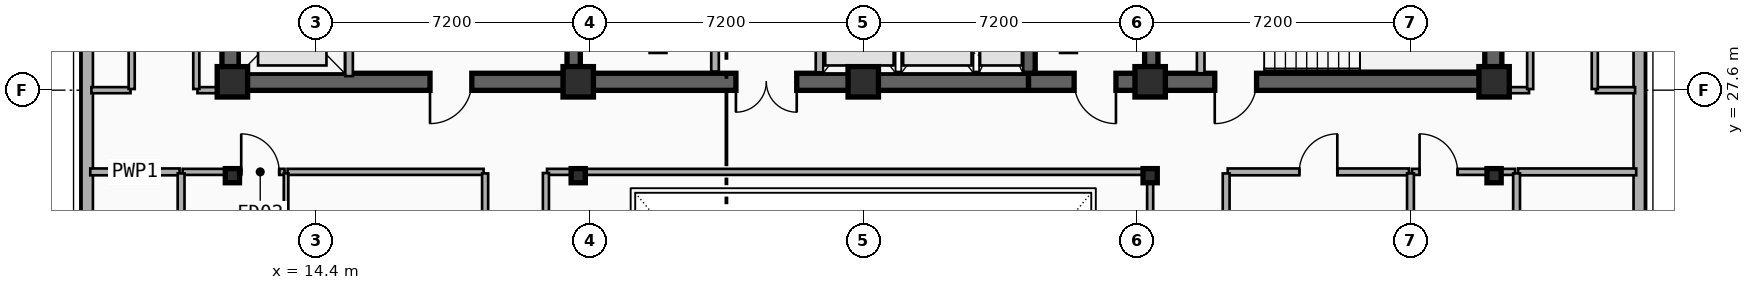
"""IFC4 building model, lengths in metres.
Left out: names, types, materials, properties, quantities, classifications, styles, units other than length and angle.
Written with IfcOpenShell. Run it as: python <this file> out.ifc"""

import sys

from ifc_helpers import new_model, si_unit, direction, frame, frame_2d, origin, origin_2d, place, context, subcontext, project, spatial, rectangle, i_section, extrude, element, fill, save


model = new_model("IFC4")
c1 = context("Model", 3, precision=1e-05, world=origin(), true_north=direction((0.0, 1.0)))
c2 = subcontext(c1, "Body", "Model", "MODEL_VIEW")
j1 = project(units=[si_unit("LENGTHUNIT", "METRE"), si_unit("PLANEANGLEUNIT", "RADIAN")], contexts=[c1])
p1 = place(None, origin())
s1 = spatial("IfcSite", under=j1, at=p1, CompositionType="ELEMENT")
p2 = place(p1, origin())
s2 = spatial("IfcBuilding", under=s1, at=p2, CompositionType="ELEMENT")
p3 = place(p2, frame((0.0, 0.0, 269.5)))
s3 = spatial("IfcBuildingStorey", under=s2, at=p3, CompositionType="ELEMENT", Elevation=269.5)
p4 = place(p3, frame((21.18, 27.82, 0.0), z_axis=(0.0, 0.0, 1.0), x_axis=(-1.0, 0.0, 0.0)))
e1 = element("IfcWall", 1, at=p4, inside=s3, PredefinedType="SHEAR", context=c2, shape_type="SweptSolid", body=[
    extrude(rectangle(XDim=9.03, YDim=0.45, at=frame_2d((4.515, 0.0))), origin(), (0.0, 0.0, 1.0), 3.7),
])
p5 = place(p4, frame((2.68, 0.0, 0.0)))
e2 = element("IfcOpeningElement", 2, at=p5, cuts=e1, PredefinedType="OPENING", context=c2, shape_type="SweptSolid", body=[
    extrude(rectangle(XDim=1.1, YDim=2.15, at=frame_2d((0.55, 1.075))), frame((0.0, 0.235, 0.0), z_axis=(0.0, -1.0, 0.0), x_axis=(1.0, 0.0, 0.0)), (0.0, 0.0, 1.0), 0.47),
])
p6 = place(p3, frame((33.15, 27.82, 0.0), z_axis=(0.0, 0.0, 1.0), x_axis=(-1.0, 0.0, 0.0)))
e3 = element("IfcWall", 3, at=p6, inside=s3, PredefinedType="SHEAR", context=c2, shape_type="SweptSolid", body=[
    extrude(rectangle(XDim=11.97, YDim=0.45, at=frame_2d((5.985, 0.0))), origin(), (0.0, 0.0, 1.0), 3.7),
])
p7 = place(p6, frame((6.1, 0.0, 0.0)))
e4 = element("IfcOpeningElement", 4, at=p7, cuts=e3, PredefinedType="OPENING", context=c2, shape_type="SweptSolid", body=[
    extrude(rectangle(XDim=1.6, YDim=2.2, at=frame_2d((0.8, 1.1))), frame((0.0, 0.235, 0.0), z_axis=(0.0, -1.0, 0.0), x_axis=(1.0, 0.0, 0.0)), (0.0, 0.0, 1.0), 0.47),
])
p8 = place(p3, frame((45.38, 27.82, 0.0), z_axis=(0.0, 0.0, 1.0), x_axis=(-1.0, 0.0, 0.0)))
e5 = element("IfcWall", 5, at=p8, inside=s3, PredefinedType="SHEAR", context=c2, shape_type="SweptSolid", body=[
    extrude(rectangle(XDim=12.23, YDim=0.45, at=frame_2d((6.115, 0.0))), origin(), (0.0, 0.0, 1.0), 3.7),
])
p9 = place(p8, frame((9.93, 0.0, 0.0)))
e6 = element("IfcOpeningElement", 6, at=p9, cuts=e5, PredefinedType="OPENING", context=c2, shape_type="SweptSolid", body=[
    extrude(rectangle(XDim=1.1, YDim=2.15, at=frame_2d((0.55, 1.075))), frame((0.0, 0.235, 0.0), z_axis=(0.0, -1.0, 0.0), x_axis=(1.0, 0.0, 0.0)), (0.0, 0.0, 1.0), 0.47),
])
p10 = place(p8, frame((6.23, 0.0, 0.0)))
e7 = element("IfcOpeningElement", 7, at=p10, cuts=e5, PredefinedType="OPENING", context=c2, shape_type="SweptSolid", body=[
    extrude(rectangle(XDim=1.1, YDim=2.15, at=frame_2d((0.55, 1.075))), frame((0.0, 0.235, 0.0), z_axis=(0.0, -1.0, 0.0), x_axis=(1.0, 0.0, 0.0)), (0.0, 0.0, 1.0), 0.47),
])
for number, where, z_axis, x_axis in (
    (8, (12.15, 28.045, 0.0), (0.0, 0.0, 1.0), (0.0, 1.0, 0.0)),
    (9, (45.38, 28.045, 0.0), (0.0, 0.0, 1.0), (0.0, 1.0, 0.0)),
):
    element("IfcWall", number, at=place(p3, frame(where, z_axis=z_axis, x_axis=x_axis)), inside=s3, PredefinedType="SHEAR", context=c2, shape_type="SweptSolid", body=[
        extrude(rectangle(XDim=8.78, YDim=0.45, at=frame_2d((4.39, 0.0))), origin(), (0.0, 0.0, 1.0), 3.7),
    ])
for number, where, z_axis, x_axis in (
    (10, (21.18, 28.045, 0.0), (0.0, 0.0, 1.0), (0.0, 1.0, 0.0)),
    (11, (33.15, 28.045, 0.0), (0.0, 0.0, 1.0), (0.0, 1.0, 0.0)),
):
    element("IfcWall", number, at=place(p3, frame(where, z_axis=z_axis, x_axis=x_axis)), inside=s3, PredefinedType="SHEAR", context=c2, shape_type="SweptSolid", body=[
        extrude(rectangle(XDim=8.78, YDim=0.35, at=frame_2d((4.39, 0.0))), origin(), (0.0, 0.0, 1.0), 3.7),
    ])
p11 = place(p3, frame((36.38, 28.045, 0.0), z_axis=(0.0, 0.0, 1.0), x_axis=(0.0, 1.0, 0.0)))
e12 = element("IfcWall", 12, at=p11, inside=s3, PredefinedType="SHEAR", context=c2, shape_type="SweptSolid", body=[
    extrude(rectangle(XDim=8.78, YDim=0.35, at=frame_2d((4.39, 0.0))), origin(), (0.0, 0.0, 1.0), 3.7),
])
p12 = place(p11, frame((3.735, 0.0, 0.0)))
e13 = element("IfcOpeningElement", 13, at=p12, cuts=e12, PredefinedType="OPENING", context=c2, shape_type="SweptSolid", body=[
    extrude(rectangle(XDim=1.1, YDim=2.15, at=frame_2d((0.55, 1.075))), frame((0.0, 0.185, 0.0), z_axis=(0.0, -1.0, 0.0), x_axis=(1.0, 0.0, 0.0)), (0.0, 0.0, 1.0), 0.37),
])
for number, where, z_axis, x_axis in (
    (14, (12.2, 27.82, 0.0), (0.0, 0.0, 1.0), (1.0, 0.0, 0.0)),
    (15, (21.3, 27.82, 0.0), (0.0, 0.0, 1.0), (1.0, 0.0, 0.0)),
    (16, (28.8, 27.82, 0.0), (0.0, 0.0, 1.0), (1.0, 0.0, 0.0)),
    (17, (36.35, 27.82, 0.0), (0.0, 0.0, 1.0), (1.0, 0.0, 0.0)),
    (18, (45.4, 27.82, 0.0), (0.0, 0.0, 1.0), (1.0, 0.0, 0.0)),
):
    element("IfcColumn", number, at=place(p3, frame(where, z_axis=z_axis, x_axis=x_axis)), inside=s3, PredefinedType="COLUMN", context=c2, shape_type="SweptSolid", body=[
        extrude(rectangle(XDim=0.8, YDim=0.8, at=origin_2d()), origin(), (0.0, 0.0, 1.0), 3.7),
    ])
for number, where, z_axis, x_axis in (
    (19, (12.2, 25.35, 0.0), (0.0, 0.0, 1.0), (1.0, 0.0, 0.0)),
    (20, (21.3, 25.35, 0.0), (0.0, 0.0, 1.0), (1.0, 0.0, 0.0)),
    (21, (36.35, 25.35, 0.0), (0.0, 0.0, 1.0), (1.0, 0.0, 0.0)),
    (22, (45.4, 25.35, 0.0), (0.0, 0.0, 1.0), (1.0, 0.0, 0.0)),
):
    element("IfcColumn", number, at=place(p3, frame(where, z_axis=z_axis, x_axis=x_axis)), inside=s3, PredefinedType="COLUMN", context=c2, shape_type="SweptSolid", body=[
        extrude(i_section(OverallWidth=0.374, OverallDepth=0.372, WebThickness=0.017, FlangeThickness=0.027, FilletRadius=0.015, at=origin_2d()), origin(), (0.0, 0.0, 1.0), 3.7),
    ])
p13 = place(p3, frame((49.22, 36.8, 0.0), z_axis=(0.0, 0.0, 1.0), x_axis=(0.0, -1.0, 0.0)))
e23 = element("IfcWall", 23, at=p13, inside=s3, PredefinedType="SOLIDWALL", context=c2, shape_type="SweptSolid", body=[
    extrude(rectangle(XDim=34.2, YDim=0.3, at=frame_2d((17.1, 0.0))), origin(), (0.0, 0.0, 1.0), 3.42),
])
p14 = place(p13, frame((25.775, 0.0, 0.75)))
e24 = element("IfcOpeningElement", 24, at=p14, cuts=e23, PredefinedType="OPENING", context=c2, shape_type="SweptSolid", body=[
    extrude(rectangle(XDim=2.1, YDim=2.1, at=frame_2d((1.05, 1.05))), frame((0.0, 0.16, 0.0), z_axis=(0.0, -1.0, 0.0), x_axis=(1.0, 0.0, 0.0)), (0.0, 0.0, 1.0), 0.32),
])
p15 = place(p13, frame((29.664, 0.0, 0.75)))
e25 = element("IfcOpeningElement", 25, at=p15, cuts=e23, PredefinedType="OPENING", context=c2, shape_type="SweptSolid", body=[
    extrude(rectangle(XDim=2.1, YDim=2.1, at=frame_2d((1.05, 1.05))), frame((0.0, 0.16, 0.0), z_axis=(0.0, -1.0, 0.0), x_axis=(1.0, 0.0, 0.0)), (0.0, 0.0, 1.0), 0.32),
])
p16 = place(p3, frame((8.38, 2.6, 0.0), z_axis=(0.0, 0.0, 1.0), x_axis=(0.0, 1.0, 0.0)))
e26 = element("IfcWall", 26, at=p16, inside=s3, PredefinedType="SOLIDWALL", context=c2, shape_type="SweptSolid", body=[
    extrude(rectangle(XDim=34.2, YDim=0.3, at=frame_2d((17.1, 0.0))), origin(), (0.0, 0.0, 1.0), 3.42),
])
p17 = place(p16, frame((1.584, 0.0, 0.75)))
e27 = element("IfcOpeningElement", 27, at=p17, cuts=e26, PredefinedType="OPENING", context=c2, shape_type="SweptSolid", body=[
    extrude(rectangle(XDim=2.1, YDim=2.1, at=frame_2d((1.05, 1.05))), frame((0.0, 0.16, 0.0), z_axis=(0.0, -1.0, 0.0), x_axis=(1.0, 0.0, 0.0)), (0.0, 0.0, 1.0), 0.32),
])
p18 = place(p16, frame((4.948, 0.0, 0.75)))
e28 = element("IfcOpeningElement", 28, at=p18, cuts=e26, PredefinedType="OPENING", context=c2, shape_type="SweptSolid", body=[
    extrude(rectangle(XDim=2.1, YDim=2.1, at=frame_2d((1.05, 1.05))), frame((0.0, 0.16, 0.0), z_axis=(0.0, -1.0, 0.0), x_axis=(1.0, 0.0, 0.0)), (0.0, 0.0, 1.0), 0.32),
])
p19 = place(p3, frame((15.27, 27.97, 0.0), z_axis=(0.0, 0.0, 1.0), x_axis=(0.0, 1.0, 0.0)))
e29 = element("IfcWall", 29, at=p19, inside=s3, PredefinedType="PARTITIONING", context=c2, shape_type="SweptSolid", body=[
    extrude(rectangle(XDim=2.96, YDim=0.2, at=frame_2d((1.48, 0.0))), origin(), (0.0, 0.0, 1.0), 2.49),
])
p20 = place(p19, frame((0.93, 0.0, 0.0)))
e30 = element("IfcOpeningElement", 30, at=p20, cuts=e29, PredefinedType="OPENING", context=c2, shape_type="SweptSolid", body=[
    extrude(rectangle(XDim=1.1, YDim=2.15, at=frame_2d((0.55, 1.075))), frame((0.0, 0.11, 0.0), z_axis=(0.0, -1.0, 0.0), x_axis=(1.0, 0.0, 0.0)), (0.0, 0.0, 1.0), 0.22),
])
p21 = place(p3, frame((27.65, 28.07, 0.0), z_axis=(0.0, 0.0, 1.0), x_axis=(0.0, 1.0, 0.0)))
e31 = element("IfcWall", 31, at=p21, inside=s3, PredefinedType="PARTITIONING", context=c2, shape_type="SweptSolid", body=[
    extrude(rectangle(XDim=2.58, YDim=0.2, at=frame_2d((1.29, 0.0))), origin(), (0.0, 0.0, 1.0), 2.49),
])
p22 = place(p3, frame((37.68, 28.045, 0.0), z_axis=(0.0, 0.0, 1.0), x_axis=(0.0, 1.0, 0.0)))
e32 = element("IfcWall", 32, at=p22, inside=s3, PredefinedType="PARTITIONING", context=c2, shape_type="SweptSolid", body=[
    extrude(rectangle(XDim=3.205, YDim=0.2, at=frame_2d((1.603, 0.0))), origin(), (0.0, 0.0, 1.0), 2.8),
])
p23 = place(p3, frame((24.9, 28.09, 0.0), z_axis=(0.0, 0.0, 1.0), x_axis=(0.0, 1.0, 0.0)))
e33 = element("IfcWall", 33, at=p23, inside=s3, PredefinedType="PARTITIONING", context=c2, shape_type="SweptSolid", body=[
    extrude(rectangle(XDim=2.62, YDim=0.2, at=frame_2d((1.31, 0.0))), origin(), (0.0, 0.0, 1.0), 2.8),
])
p24 = place(p23, frame((1.137, 0.0, 0.0)))
e34 = element("IfcOpeningElement", 34, at=p24, cuts=e33, PredefinedType="OPENING", context=c2, shape_type="SweptSolid", body=[
    extrude(rectangle(XDim=1.2, YDim=2.15, at=frame_2d((0.6, 1.075))), frame((0.0, 0.11, 0.0), z_axis=(0.0, -1.0, 0.0), x_axis=(1.0, 0.0, 0.0)), (0.0, 0.0, 1.0), 0.22),
])
p25 = place(p3, frame((10.89, 25.45, 0.0), z_axis=(0.0, 0.0, 1.0), x_axis=(1.0, 0.0, 0.0)))
e35 = element("IfcWall", 35, at=p25, inside=s3, PredefinedType="PARTITIONING", context=c2, shape_type="SweptSolid", body=[
    extrude(rectangle(XDim=2.682, YDim=0.16, at=frame_2d((1.341, 0.0))), origin(), (0.0, 0.0, 1.0), 2.7),
])
p26 = place(p25, frame((1.542, 0.0, 0.0)))
e36 = element("IfcOpeningElement", 36, at=p26, cuts=e35, PredefinedType="OPENING", context=c2, shape_type="SweptSolid", body=[
    extrude(rectangle(XDim=1.0, YDim=2.15, at=frame_2d((0.5, 1.075))), frame((0.0, 0.09, 0.0), z_axis=(0.0, -1.0, 0.0), x_axis=(1.0, 0.0, 0.0)), (0.0, 0.0, 1.0), 0.18),
])
p27 = place(p3, frame((8.46, 25.45, 0.0), z_axis=(0.0, 0.0, 1.0), x_axis=(1.0, 0.0, 0.0)))
e37 = element("IfcWall", 37, at=p27, inside=s3, PredefinedType="PLUMBINGWALL", context=c2, shape_type="SweptSolid", body=[
    extrude(rectangle(XDim=2.35, YDim=0.18, at=frame_2d((1.175, 0.0))), origin(), (0.0, 0.0, 1.0), 3.42),
])
p28 = place(p3, frame((13.652, 25.45, 0.0), z_axis=(0.0, 0.0, 1.0), x_axis=(1.0, 0.0, 0.0)))
e38 = element("IfcWall", 38, at=p28, inside=s3, PredefinedType="PARTITIONING", context=c2, shape_type="SweptSolid", body=[
    extrude(rectangle(XDim=5.158, YDim=0.16, at=frame_2d((2.579, 0.0))), origin(), (0.0, 0.0, 1.0), 3.42),
])
p29 = place(p3, frame((38.39, 25.45, 0.0), z_axis=(0.0, 0.0, 1.0), x_axis=(1.0, 0.0, 0.0)))
e39 = element("IfcWall", 39, at=p29, inside=s3, PredefinedType="PLUMBINGWALL", context=c2, shape_type="SweptSolid", body=[
    extrude(rectangle(XDim=4.77, YDim=0.18, at=frame_2d((2.385, 0.0))), origin(), (0.0, 0.0, 1.0), 3.42),
])
p30 = place(p29, frame((1.885, 0.0, 0.0)))
e40 = element("IfcOpeningElement", 40, at=p30, cuts=e39, PredefinedType="OPENING", context=c2, shape_type="SweptSolid", body=[
    extrude(rectangle(XDim=1.0, YDim=2.15, at=frame_2d((0.5, 1.075))), frame((0.0, 0.1, 0.0), z_axis=(0.0, -1.0, 0.0), x_axis=(1.0, 0.0, 0.0)), (0.0, 0.0, 1.0), 0.2),
])
p31 = place(p3, frame((43.24, 25.45, 0.0), z_axis=(0.0, 0.0, 1.0), x_axis=(1.0, 0.0, 0.0)))
e41 = element("IfcWall", 41, at=p31, inside=s3, PredefinedType="PARTITIONING", context=c2, shape_type="SweptSolid", body=[
    extrude(rectangle(XDim=2.712, YDim=0.16, at=frame_2d((1.356, 0.0))), origin(), (0.0, 0.0, 1.0), 2.7),
])
p32 = place(p31, frame((0.2, 0.0, 0.0)))
e42 = element("IfcOpeningElement", 42, at=p32, cuts=e41, PredefinedType="OPENING", context=c2, shape_type="SweptSolid", body=[
    extrude(rectangle(XDim=1.0, YDim=2.15, at=frame_2d((0.5, 1.075))), frame((0.0, 0.09, 0.0), z_axis=(0.0, -1.0, 0.0), x_axis=(1.0, 0.0, 0.0)), (0.0, 0.0, 1.0), 0.18),
])
p33 = place(p3, frame((46.032, 25.45, 0.0), z_axis=(0.0, 0.0, 1.0), x_axis=(1.0, 0.0, 0.0)))
e43 = element("IfcWall", 43, at=p33, inside=s3, PredefinedType="PLUMBINGWALL", context=c2, shape_type="SweptSolid", body=[
    extrude(rectangle(XDim=3.108, YDim=0.18, at=frame_2d((1.554, 0.0))), origin(), (0.0, 0.0, 1.0), 3.42),
])
p34 = place(p3, frame((18.85, 20.608, 0.0), z_axis=(0.0, 0.0, 1.0), x_axis=(0.0, 1.0, 0.0)))
e44 = element("IfcWall", 44, at=p34, inside=s3, PredefinedType="PARTITIONING", context=c2, shape_type="SweptSolid", body=[
    extrude(rectangle(XDim=4.802, YDim=0.16, at=frame_2d((2.401, 0.0))), origin(), (0.0, 0.0, 1.0), 2.96),
])
p35 = place(p3, frame((38.35, 19.04, 0.0), z_axis=(0.0, 0.0, 1.0), x_axis=(0.0, 1.0, 0.0)))
e45 = element("IfcWall", 45, at=p35, inside=s3, PredefinedType="PLUMBINGWALL", context=c2, shape_type="SweptSolid", body=[
    extrude(rectangle(XDim=6.37, YDim=0.18, at=frame_2d((3.185, 0.0))), origin(), (0.0, 0.0, 1.0), 2.96),
])
p36 = place(p35, frame((2.685, 0.0, 0.0)))
e46 = element("IfcOpeningElement", 46, at=p36, cuts=e45, PredefinedType="OPENING", context=c2, shape_type="SweptSolid", body=[
    extrude(rectangle(XDim=1.0, YDim=2.15, at=frame_2d((0.5, 1.075))), frame((0.0, 0.1, 0.0), z_axis=(0.0, -1.0, 0.0), x_axis=(1.0, 0.0, 0.0)), (0.0, 0.0, 1.0), 0.2),
])
p37 = place(p3, frame((10.85, 18.586, 0.0), z_axis=(0.0, 0.0, 1.0), x_axis=(0.0, 1.0, 0.0)))
e47 = element("IfcWall", 47, at=p37, inside=s3, PredefinedType="PLUMBINGWALL", context=c2, shape_type="SweptSolid", body=[
    extrude(rectangle(XDim=6.824, YDim=0.18, at=frame_2d((3.412, 0.0))), origin(), (0.0, 0.0, 1.0), 2.9),
])
p38 = place(p37, frame((2.987, 0.0, 0.0)))
e48 = element("IfcOpeningElement", 48, at=p38, cuts=e47, PredefinedType="OPENING", context=c2, shape_type="SweptSolid", body=[
    extrude(rectangle(XDim=0.85, YDim=2.1, at=frame_2d((0.425, 1.05))), frame((0.0, 0.1, 0.0), z_axis=(0.0, -1.0, 0.0), x_axis=(1.0, 0.0, 0.0)), (0.0, 0.0, 1.0), 0.2),
])
p39 = place(p3, frame((13.612, 20.608, 0.0), z_axis=(0.0, 0.0, 1.0), x_axis=(0.0, 1.0, 0.0)))
e49 = element("IfcWall", 49, at=p39, inside=s3, PredefinedType="PARTITIONING", context=c2, shape_type="SweptSolid", body=[
    extrude(rectangle(XDim=4.802, YDim=0.12, at=frame_2d((2.401, 0.0))), origin(), (0.0, 0.0, 1.0), 2.96),
])
p40 = place(p39, frame((1.951, 0.0, 0.0)))
e50 = element("IfcOpeningElement", 50, at=p40, cuts=e49, PredefinedType="OPENING", context=c2, shape_type="SweptSolid", body=[
    extrude(rectangle(XDim=0.9, YDim=2.1, at=frame_2d((0.45, 1.05))), frame((0.0, 0.07, 0.0), z_axis=(0.0, -1.0, 0.0), x_axis=(1.0, 0.0, 0.0)), (0.0, 0.0, 1.0), 0.14),
])
p41 = place(p3, frame((43.2, 19.04, 0.0), z_axis=(0.0, 0.0, 1.0), x_axis=(0.0, 1.0, 0.0)))
e51 = element("IfcWall", 51, at=p41, inside=s3, PredefinedType="PLUMBINGWALL", context=c2, shape_type="SweptSolid", body=[
    extrude(rectangle(XDim=6.37, YDim=0.18, at=frame_2d((3.185, 0.0))), origin(), (0.0, 0.0, 1.0), 2.96),
])
p42 = place(p3, frame((45.992, 19.772, 0.0), z_axis=(0.0, 0.0, 1.0), x_axis=(0.0, 1.0, 0.0)))
e52 = element("IfcWall", 52, at=p42, inside=s3, PredefinedType="PLUMBINGWALL", context=c2, shape_type="SweptSolid", body=[
    extrude(rectangle(XDim=5.638, YDim=0.18, at=frame_2d((2.819, 0.0))), origin(), (0.0, 0.0, 1.0), 2.7),
])
p43 = place(p42, frame((2.394, 0.0, 0.0)))
e53 = element("IfcOpeningElement", 53, at=p43, cuts=e52, PredefinedType="OPENING", context=c2, shape_type="SweptSolid", body=[
    extrude(rectangle(XDim=0.85, YDim=2.1, at=frame_2d((0.425, 1.05))), frame((0.0, 0.1, 0.0), z_axis=(0.0, -1.0, 0.0), x_axis=(1.0, 0.0, 0.0)), (0.0, 0.0, 1.0), 0.2),
])
p44 = place(p3, frame((20.48, 25.45, 0.0), z_axis=(0.0, 0.0, 1.0), x_axis=(1.0, 0.0, 0.0)))
e54 = element("IfcWall", 54, at=p44, inside=s3, PredefinedType="PARTITIONING", context=c2, shape_type="SweptSolid", body=[
    extrude(rectangle(XDim=15.84, YDim=0.16, at=frame_2d((7.92, 0.0))), origin(), (0.0, 0.0, 1.0), 2.7),
])
p45 = place(p3, frame((8.49, 27.6, 0.0), z_axis=(0.0, 0.0, 1.0), x_axis=(1.0, 0.0, 0.0)))
e55 = element("IfcWall", 55, at=p45, inside=s3, PredefinedType="PARTITIONING", context=c2, shape_type="SweptSolid", body=[
    extrude(rectangle(XDim=1.03, YDim=0.16, at=frame_2d((0.515, 0.0))), origin(), (0.0, 0.0, 1.0), 3.42),
])
p46 = place(p3, frame((11.28, 27.6, 0.0), z_axis=(0.0, 0.0, 1.0), x_axis=(1.0, 0.0, 0.0)))
e56 = element("IfcWall", 56, at=p46, inside=s3, PredefinedType="PARTITIONING", context=c2, shape_type="SweptSolid", body=[
    extrude(rectangle(XDim=0.84, YDim=0.16, at=frame_2d((0.42, 0.0))), origin(), (0.0, 0.0, 1.0), 2.49),
])
p47 = place(p3, frame((45.41, 27.6, 0.0), z_axis=(0.0, 0.0, 1.0), x_axis=(1.0, 0.0, 0.0)))
e57 = element("IfcWall", 57, at=p47, inside=s3, PredefinedType="PARTITIONING", context=c2, shape_type="SweptSolid", body=[
    extrude(rectangle(XDim=0.91, YDim=0.16, at=frame_2d((0.455, 0.0))), origin(), (0.0, 0.0, 1.0), 2.49),
])
p48 = place(p3, frame((48.08, 27.6, 0.0), z_axis=(0.0, 0.0, 1.0), x_axis=(1.0, 0.0, 0.0)))
e58 = element("IfcWall", 58, at=p48, inside=s3, PredefinedType="PARTITIONING", context=c2, shape_type="SweptSolid", body=[
    extrude(rectangle(XDim=1.03, YDim=0.16, at=frame_2d((0.515, 0.0))), origin(), (0.0, 0.0, 1.0), 3.42),
])
p49 = place(p3, frame((20.45, 10.43, 0.0), z_axis=(0.0, 0.0, 1.0), x_axis=(0.0, 1.0, 0.0)))
e59 = element("IfcWall", 59, at=p49, inside=s3, PredefinedType="PARTITIONING", context=c2, shape_type="SweptSolid", body=[
    extrude(rectangle(XDim=14.99, YDim=0.16, at=frame_2d((7.495, 0.0))), origin(), (0.0, 0.0, 1.0), 2.96),
])
p50 = place(p3, frame((36.35, 10.43, 0.0), z_axis=(0.0, 0.0, 1.0), x_axis=(0.0, 1.0, 0.0)))
e60 = element("IfcWall", 60, at=p50, inside=s3, PredefinedType="PARTITIONING", context=c2, shape_type="SweptSolid", body=[
    extrude(rectangle(XDim=14.99, YDim=0.16, at=frame_2d((7.495, 0.0))), origin(), (0.0, 0.0, 1.0), 2.7),
])
for number, where, z_axis, x_axis in (
    (61, (9.55, 27.63, 0.0), (0.0, 0.0, 1.0), (0.0, 1.0, 0.0)),
    (62, (11.25, 27.63, 0.0), (0.0, 0.0, 1.0), (0.0, 1.0, 0.0)),
    (63, (46.35, 27.63, 0.0), (0.0, 0.0, 1.0), (0.0, 1.0, 0.0)),
    (64, (48.05, 27.63, 0.0), (0.0, 0.0, 1.0), (0.0, 1.0, 0.0)),
):
    element("IfcWall", number, at=place(p3, frame(where, z_axis=z_axis, x_axis=x_axis)), inside=s3, PredefinedType="PARTITIONING", context=c2, shape_type="SweptSolid", body=[
        extrude(rectangle(XDim=10.24, YDim=0.16, at=frame_2d((5.12, 0.0))), origin(), (0.0, 0.0, 1.0), 2.9),
    ])
p51 = place(p5, origin())
e65 = element("IfcDoor", 65, at=p51, inside=s3, OperationType="SINGLE_SWING_RIGHT", PredefinedType="DOOR", context=c2, shape_type="SweptSolid", body=[
    extrude(rectangle(XDim=1.1, YDim=2.15, at=frame_2d((0.55, 1.075))), frame((0.0, 0.025, 0.0), z_axis=(0.0, -1.0, 0.0), x_axis=(1.0, 0.0, 0.0)), (0.0, 0.0, 1.0), 0.05),
])
fill(e2, e65)
p52 = place(p9, origin())
e66 = element("IfcDoor", 66, at=p52, inside=s3, OperationType="SINGLE_SWING_LEFT", PredefinedType="DOOR", context=c2, shape_type="SweptSolid", body=[
    extrude(rectangle(XDim=1.1, YDim=2.15, at=frame_2d((0.55, 1.075))), frame((0.0, 0.025, 0.0), z_axis=(0.0, -1.0, 0.0), x_axis=(1.0, 0.0, 0.0)), (0.0, 0.0, 1.0), 0.05),
])
fill(e6, e66)
p53 = place(p10, origin())
e67 = element("IfcDoor", 67, at=p53, inside=s3, OperationType="SINGLE_SWING_RIGHT", PredefinedType="DOOR", context=c2, shape_type="SweptSolid", body=[
    extrude(rectangle(XDim=1.1, YDim=2.15, at=frame_2d((0.55, 1.075))), frame((0.0, 0.025, 0.0), z_axis=(0.0, -1.0, 0.0), x_axis=(1.0, 0.0, 0.0)), (0.0, 0.0, 1.0), 0.05),
])
fill(e7, e67)
p54 = place(p7, origin())
e68 = element("IfcDoor", 68, at=p54, inside=s3, OperationType="SINGLE_SWING_LEFT", PredefinedType="DOOR", context=c2, shape_type="SweptSolid", body=[
    extrude(rectangle(XDim=1.6, YDim=2.2, at=frame_2d((0.8, 1.1))), frame((0.0, 0.025, 0.0), z_axis=(0.0, -1.0, 0.0), x_axis=(1.0, 0.0, 0.0)), (0.0, 0.0, 1.0), 0.05),
])
fill(e4, e68)
p55 = place(p26, origin())
e69 = element("IfcDoor", 69, at=p55, inside=s3, OperationType="SINGLE_SWING_LEFT", PredefinedType="DOOR", context=c2, shape_type="SweptSolid", body=[
    extrude(rectangle(XDim=1.0, YDim=2.15, at=frame_2d((0.5, 1.075))), frame((0.0, 0.025, 0.0), z_axis=(0.0, -1.0, 0.0), x_axis=(1.0, 0.0, 0.0)), (0.0, 0.0, 1.0), 0.05),
])
fill(e36, e69)
p56 = place(p30, origin())
e70 = element("IfcDoor", 70, at=p56, inside=s3, OperationType="SINGLE_SWING_RIGHT", PredefinedType="DOOR", context=c2, shape_type="SweptSolid", body=[
    extrude(rectangle(XDim=1.0, YDim=2.15, at=frame_2d((0.5, 1.075))), frame((0.0, 0.025, 0.0), z_axis=(0.0, -1.0, 0.0), x_axis=(1.0, 0.0, 0.0)), (0.0, 0.0, 1.0), 0.05),
])
fill(e40, e70)
p57 = place(p32, origin())
e71 = element("IfcDoor", 71, at=p57, inside=s3, OperationType="SINGLE_SWING_LEFT", PredefinedType="DOOR", context=c2, shape_type="SweptSolid", body=[
    extrude(rectangle(XDim=1.0, YDim=2.15, at=frame_2d((0.5, 1.075))), frame((0.0, 0.025, 0.0), z_axis=(0.0, -1.0, 0.0), x_axis=(1.0, 0.0, 0.0)), (0.0, 0.0, 1.0), 0.05),
])
fill(e42, e71)
save(model, sys.argv[1])
